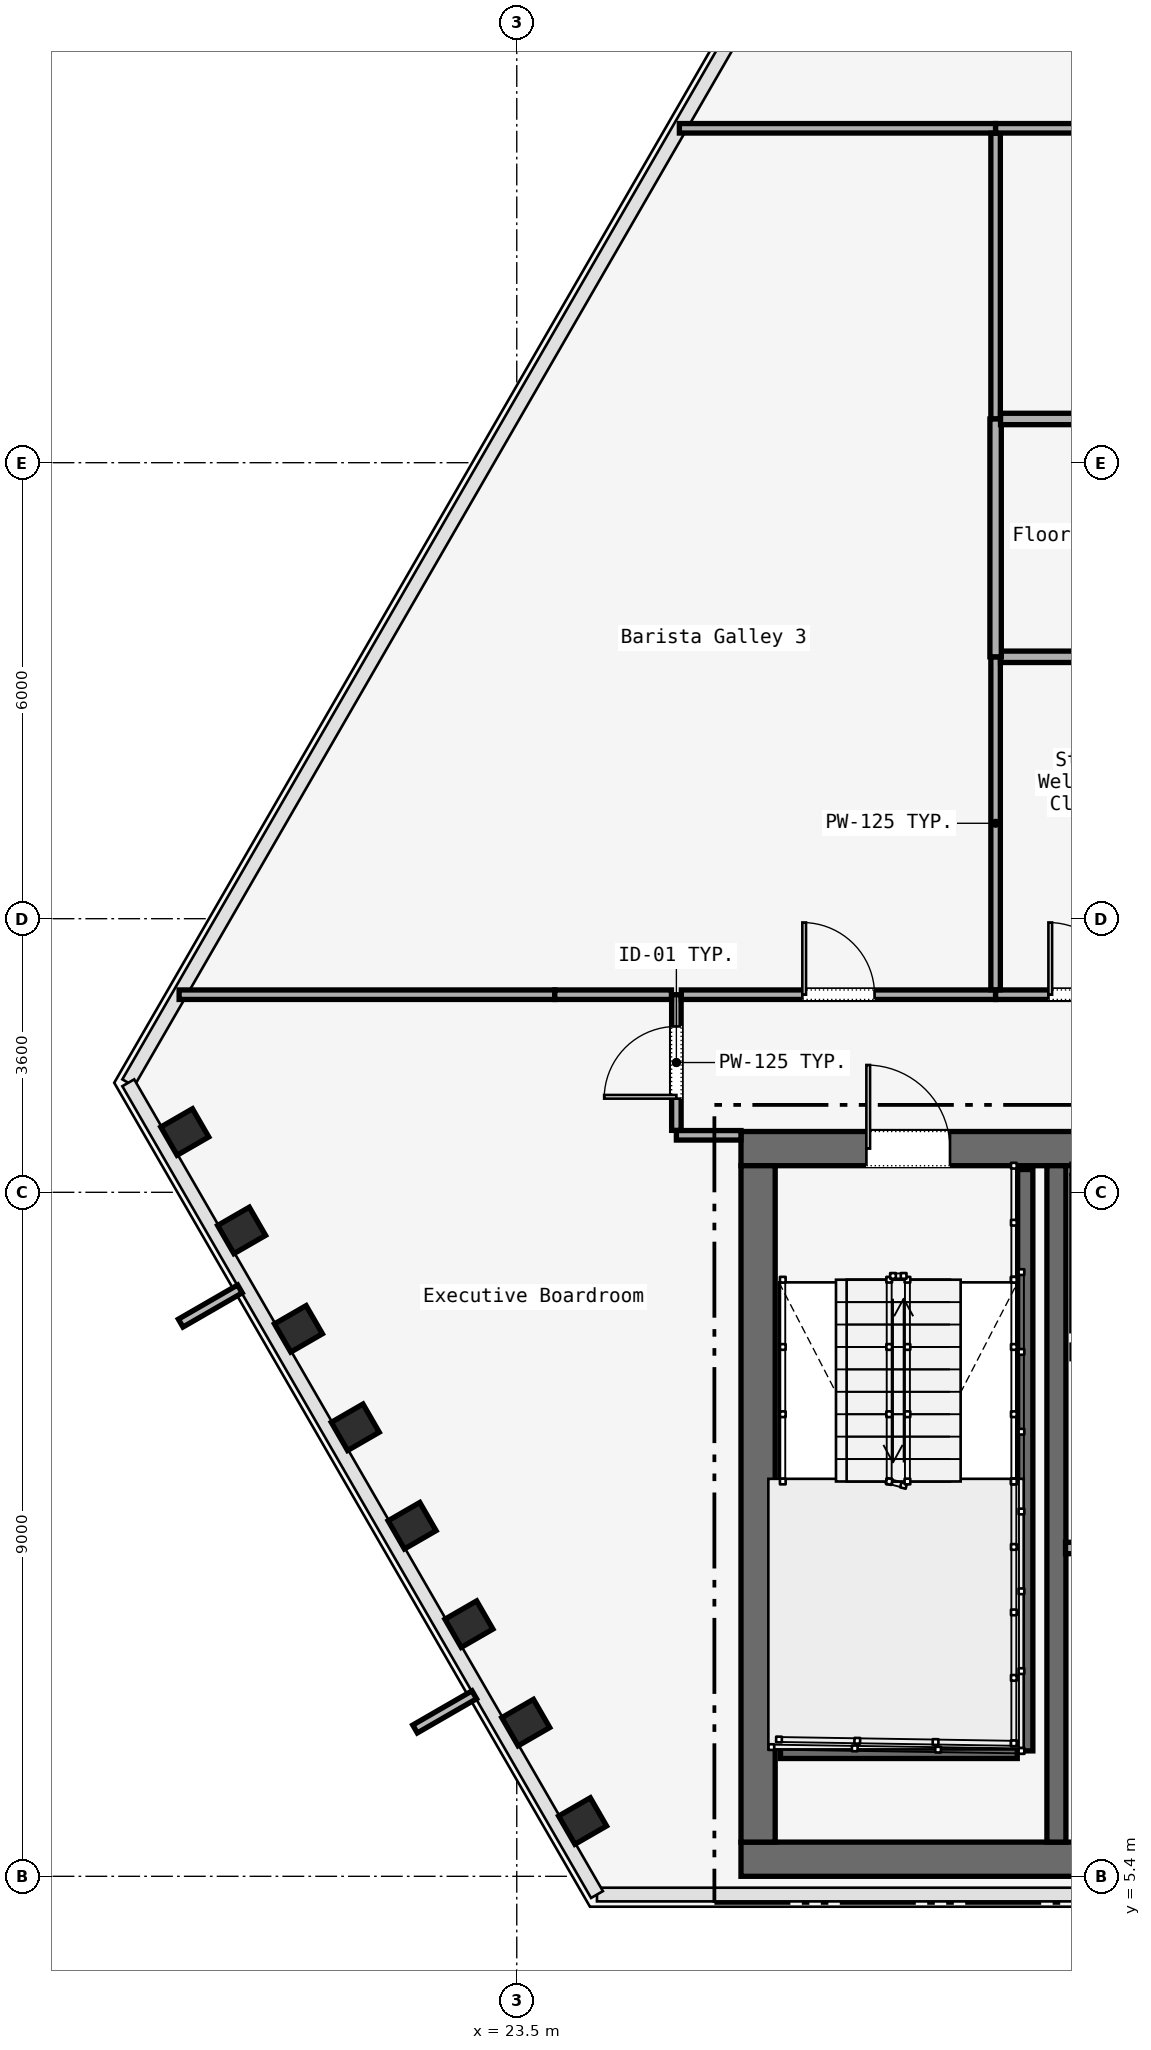
"""IFC4 building model, lengths in metres.
Left out: names, types, materials, properties, quantities, classifications, styles, units other than length and angle.
Written with IfcOpenShell. Run it as: python <this file> out.ifc"""

import sys

from ifc_helpers import new_model, si_unit, direction, frame, frame_2d, origin, origin_2d, place, context, subcontext, project, spatial, rectangle, i_section, extrude, element, fill, save


model = new_model("IFC4")
c1 = context("Model", 3, precision=1e-05, world=origin(), true_north=direction((0.0, 1.0)))
c2 = subcontext(c1, "Body", "Model", "MODEL_VIEW")
j1 = project(units=[si_unit("LENGTHUNIT", "METRE"), si_unit("PLANEANGLEUNIT", "RADIAN")], contexts=[c1])
p1 = place(None, origin())
s1 = spatial("IfcSite", under=j1, at=p1, CompositionType="ELEMENT")
p2 = place(p1, origin())
s2 = spatial("IfcBuilding", under=s1, at=p2, CompositionType="ELEMENT")
p3 = place(p2, frame((0.0, 0.0, 127.0)))
s3 = spatial("IfcBuildingStorey", under=s2, at=p3, CompositionType="ELEMENT", Elevation=127.0)
p4 = place(p3, frame((26.45, 14.975, 0.0), z_axis=(0.0, 0.0, 1.0), x_axis=(1.0, 0.0, 0.0)))
e1 = element("IfcWall", 1, at=p4, inside=s3, PredefinedType="SOLIDWALL", context=c2, shape_type="SweptSolid", body=[
    extrude(rectangle(XDim=31.1, YDim=0.45, at=frame_2d((15.55, 0.0))), origin(), (0.0, 0.0, 1.0), 3.58),
])
p5 = place(p4, frame((1.65, 0.0, 0.0)))
e2 = element("IfcOpeningElement", 2, at=p5, cuts=e1, PredefinedType="OPENING", context=c2, shape_type="SweptSolid", body=[
    extrude(rectangle(XDim=1.1, YDim=2.2, at=frame_2d((0.55, 1.1))), frame((0.0, 0.225, 0.0), z_axis=(0.0, -1.0, 0.0), x_axis=(1.0, 0.0, 0.0)), (0.0, 0.0, 1.0), 0.45),
])
p6 = place(p4, frame((13.65, 0.0, 0.0)))
e3 = element("IfcOpeningElement", 3, at=p6, cuts=e1, PredefinedType="OPENING", context=c2, shape_type="SweptSolid", body=[
    extrude(rectangle(XDim=1.1, YDim=2.2, at=frame_2d((0.55, 1.1))), frame((0.0, 0.225, 0.0), z_axis=(0.0, -1.0, 0.0), x_axis=(1.0, 0.0, 0.0)), (0.0, 0.0, 1.0), 0.45),
])
p7 = place(p4, frame((25.55, 0.0, 0.0)))
e4 = element("IfcOpeningElement", 4, at=p7, cuts=e1, PredefinedType="OPENING", context=c2, shape_type="SweptSolid", body=[
    extrude(rectangle(XDim=1.1, YDim=2.2, at=frame_2d((0.55, 1.1))), frame((0.0, 0.225, 0.0), z_axis=(0.0, -1.0, 0.0), x_axis=(1.0, 0.0, 0.0)), (0.0, 0.0, 1.0), 0.45),
])
p8 = place(p4, frame((10.7, 0.0, 0.0)))
e5 = element("IfcOpeningElement", 5, at=p8, cuts=e1, PredefinedType="OPENING", context=c2, shape_type="SweptSolid", body=[
    extrude(rectangle(XDim=1.4, YDim=2.2, at=frame_2d((0.7, 1.1))), frame((0.0, 0.225, 0.0), z_axis=(0.0, -1.0, 0.0), x_axis=(1.0, 0.0, 0.0)), (0.0, 0.0, 1.0), 0.45),
])
p9 = place(p4, frame((19.35, 0.0, 0.0)))
e6 = element("IfcOpeningElement", 6, at=p9, cuts=e1, PredefinedType="OPENING", context=c2, shape_type="SweptSolid", body=[
    extrude(rectangle(XDim=1.1, YDim=2.2, at=frame_2d((0.55, 1.1))), frame((0.0, 0.225, 0.0), z_axis=(0.0, -1.0, 0.0), x_axis=(1.0, 0.0, 0.0)), (0.0, 0.0, 1.0), 0.45),
])
p10 = place(p4, frame((21.4, 0.0, 0.0)))
e7 = element("IfcOpeningElement", 7, at=p10, cuts=e1, PredefinedType="OPENING", context=c2, shape_type="SweptSolid", body=[
    extrude(rectangle(XDim=0.9, YDim=2.1, at=frame_2d((0.45, 1.05))), frame((0.0, 0.225, 0.0), z_axis=(0.0, -1.0, 0.0), x_axis=(1.0, 0.0, 0.0)), (0.0, 0.0, 1.0), 0.45),
])
p11 = place(p4, frame((23.35, 0.0, 0.0)))
e8 = element("IfcOpeningElement", 8, at=p11, cuts=e1, PredefinedType="OPENING", context=c2, shape_type="SweptSolid", body=[
    extrude(rectangle(XDim=1.3, YDim=2.3, at=frame_2d((0.65, 1.15))), frame((0.0, 0.225, 0.0), z_axis=(0.0, -1.0, 0.0), x_axis=(1.0, 0.0, 0.0)), (0.0, 0.0, 1.0), 0.45),
])
p12 = place(p3, frame((26.45, 5.625, 0.0), z_axis=(0.0, 0.0, 1.0), x_axis=(1.0, 0.0, 0.0)))
e9 = element("IfcWall", 9, at=p12, inside=s3, PredefinedType="SOLIDWALL", context=c2, shape_type="SweptSolid", body=[
    extrude(rectangle(XDim=31.1, YDim=0.45, at=frame_2d((15.55, 0.0))), origin(), (0.0, 0.0, 1.0), 3.58),
])
p13 = place(p3, frame((26.675, 5.85, 0.0), z_axis=(0.0, 0.0, 1.0), x_axis=(0.0, 1.0, 0.0)))
e10 = element("IfcWall", 10, at=p13, inside=s3, PredefinedType="SOLIDWALL", context=c2, shape_type="SweptSolid", body=[
    extrude(rectangle(XDim=8.9, YDim=0.45, at=frame_2d((4.45, 0.0))), origin(), (0.0, 0.0, 1.0), 3.58),
])
p14 = place(p3, frame((30.6, 5.85, 0.0), z_axis=(0.0, 0.0, 1.0), x_axis=(0.0, 1.0, 0.0)))
e11 = element("IfcWall", 11, at=p14, inside=s3, PredefinedType="SOLIDWALL", context=c2, shape_type="SweptSolid", body=[
    extrude(rectangle(XDim=8.9, YDim=0.25, at=frame_2d((4.45, 0.0))), origin(), (0.0, 0.0, 1.0), 3.58),
])
for number, where, z_axis, x_axis in (
    (12, (19.132, 15.194, 0.0), (0.0, 0.0, 1.0), (-0.5, 0.866, 0.0)),
    (13, (19.88, 13.898, 0.0), (0.0, 0.0, 1.0), (-0.5, 0.866, 0.0)),
    (14, (20.627, 12.603, 0.0), (0.0, 0.0, 1.0), (-0.5, 0.866, 0.0)),
    (15, (21.375, 11.308, 0.0), (0.0, 0.0, 1.0), (-0.5, 0.866, 0.0)),
    (16, (22.123, 10.013, 0.0), (0.0, 0.0, 1.0), (-0.5, 0.866, 0.0)),
    (17, (22.871, 8.718, 0.0), (0.0, 0.0, 1.0), (-0.5, 0.866, 0.0)),
    (18, (23.618, 7.423, 0.0), (0.0, 0.0, 1.0), (-0.5, 0.866, 0.0)),
    (19, (24.366, 6.128, 0.0), (0.0, 0.0, 1.0), (-0.5, 0.866, 0.0)),
):
    element("IfcColumn", number, at=place(p3, frame(where, z_axis=z_axis, x_axis=x_axis)), inside=s3, PredefinedType="COLUMN", context=c2, shape_type="SweptSolid", body=[
        extrude(i_section(OverallWidth=0.428, OverallDepth=0.481, WebThickness=0.051, FlangeThickness=0.065, FilletRadius=0.015, at=origin_2d()), origin(), (0.0, 0.0, 1.0), 3.58),
    ])
p15 = place(p3, frame((30.19, 14.7, 0.0), z_axis=(0.0, 0.0, 1.0), x_axis=(0.0, -1.0, 0.0)))
e20 = element("IfcWall", 20, at=p15, inside=s3, PredefinedType="SOLIDWALL", context=c2, shape_type="SweptSolid", body=[
    extrude(rectangle(XDim=7.65, YDim=0.2, at=frame_2d((3.825, 0.0))), origin(), (0.0, 0.0, 1.0), 3.8),
])
p16 = place(p3, frame((26.97, 7.05, 0.0), z_axis=(0.0, 0.0, 1.0), x_axis=(1.0, 0.0, 0.0)))
e21 = element("IfcWall", 21, at=p16, inside=s3, PredefinedType="SOLIDWALL", context=c2, shape_type="SweptSolid", body=[
    extrude(rectangle(XDim=3.115, YDim=0.2, at=frame_2d((1.558, 0.0))), origin(), (0.0, 0.0, 1.0), 3.8),
])
p17 = place(p3, frame((30.72, 9.72, 0.0), z_axis=(0.0, 0.0, 1.0), x_axis=(1.0, 0.0, 0.0)))
e22 = element("IfcWall", 22, at=p17, inside=s3, PredefinedType="PARTITIONING", context=c2, shape_type="SweptSolid", body=[
    extrude(rectangle(XDim=7.96, YDim=0.15, at=frame_2d((3.98, 0.0))), origin(), (0.0, 0.0, 1.0), 3.01),
])
p18 = place(p17, frame((1.5, 0.0, 0.0)))
e23 = element("IfcOpeningElement", 23, at=p18, cuts=e22, PredefinedType="OPENING", context=c2, shape_type="SweptSolid", body=[
    extrude(rectangle(XDim=0.95, YDim=2.2, at=frame_2d((0.475, 1.1))), frame((0.0, 0.075, 0.0), z_axis=(0.0, -1.0, 0.0), x_axis=(1.0, 0.0, 0.0)), (0.0, 0.0, 1.0), 0.15),
])
p19 = place(p17, frame((6.21, 0.0, 0.0)))
e24 = element("IfcOpeningElement", 24, at=p19, cuts=e22, PredefinedType="OPENING", context=c2, shape_type="SweptSolid", body=[
    extrude(rectangle(XDim=0.95, YDim=2.2, at=frame_2d((0.475, 1.1))), frame((0.0, 0.075, 0.0), z_axis=(0.0, -1.0, 0.0), x_axis=(1.0, 0.0, 0.0)), (0.0, 0.0, 1.0), 0.15),
])
p20 = place(p3, frame((26.45, 15.15, 0.0), z_axis=(0.0, 0.0, 1.0), x_axis=(-1.0, 0.0, 0.0)))
e25 = element("IfcWall", 25, at=p20, inside=s3, PredefinedType="PARTITIONING", context=c2, shape_type="SweptSolid", body=[
    extrude(rectangle(XDim=0.85, YDim=0.125, at=frame_2d((0.425, 0.0))), origin(), (0.0, 0.0, 1.0), 3.01),
])
p21 = place(p3, frame((25.6, 15.215, 0.0), z_axis=(0.0, 0.0, 1.0), x_axis=(0.0, 1.0, 0.0)))
e26 = element("IfcWall", 26, at=p21, inside=s3, PredefinedType="PARTITIONING", context=c2, shape_type="SweptSolid", body=[
    extrude(rectangle(XDim=1.785, YDim=0.125, at=frame_2d((0.893, 0.0))), origin(), (0.0, 0.0, 1.0), 3.01),
])
p22 = place(p21, frame((0.417, 0.0, 0.0)))
e27 = element("IfcOpeningElement", 27, at=p22, cuts=e26, PredefinedType="OPENING", context=c2, shape_type="SweptSolid", body=[
    extrude(rectangle(XDim=0.95, YDim=2.2, at=frame_2d((0.475, 1.1))), frame((0.0, 0.062, 0.0), z_axis=(0.0, -1.0, 0.0), x_axis=(1.0, 0.0, 0.0)), (0.0, 0.0, 1.0), 0.125),
])
p23 = place(p3, frame((25.665, 17.0, 0.0), z_axis=(0.0, 0.0, 1.0), x_axis=(1.0, 0.0, 0.0)))
e28 = element("IfcWall", 28, at=p23, inside=s3, PredefinedType="PARTITIONING", context=c2, shape_type="SweptSolid", body=[
    extrude(rectangle(XDim=4.135, YDim=0.125, at=frame_2d((2.067, 0.0))), origin(), (0.0, 0.0, 1.0), 3.01),
])
p24 = place(p23, frame((1.593, 0.0, 0.0)))
e29 = element("IfcOpeningElement", 29, at=p24, cuts=e28, PredefinedType="OPENING", context=c2, shape_type="SweptSolid", body=[
    extrude(rectangle(XDim=0.95, YDim=2.2, at=frame_2d((0.475, 1.1))), frame((0.0, 0.062, 0.0), z_axis=(0.0, -1.0, 0.0), x_axis=(1.0, 0.0, 0.0)), (0.0, 0.0, 1.0), 0.125),
])
p25 = place(p3, frame((29.8, 17.0, 0.0), z_axis=(0.0, 0.0, 1.0), x_axis=(1.0, 0.0, 0.0)))
e30 = element("IfcWall", 30, at=p25, inside=s3, PredefinedType="PARTITIONING", context=c2, shape_type="SweptSolid", body=[
    extrude(rectangle(XDim=2.34, YDim=0.125, at=frame_2d((1.17, 0.0))), origin(), (0.0, 0.0, 1.0), 3.01),
])
p26 = place(p25, frame((0.695, 0.0, 0.0)))
e31 = element("IfcOpeningElement", 31, at=p26, cuts=e30, PredefinedType="OPENING", context=c2, shape_type="SweptSolid", body=[
    extrude(rectangle(XDim=0.95, YDim=2.2, at=frame_2d((0.475, 1.1))), frame((0.0, 0.062, 0.0), z_axis=(0.0, -1.0, 0.0), x_axis=(1.0, 0.0, 0.0)), (0.0, 0.0, 1.0), 0.125),
])
p27 = place(p3, frame((19.058, 17.0, 0.0), z_axis=(0.0, 0.0, 1.0), x_axis=(1.0, 0.0, 0.0)))
e32 = element("IfcWall", 32, at=p27, inside=s3, PredefinedType="PARTITIONING", context=c2, shape_type="SweptSolid", body=[
    extrude(rectangle(XDim=4.942, YDim=0.125, at=frame_2d((2.471, 0.0))), origin(), (0.0, 0.0, 1.0), 3.01),
])
p28 = place(p3, frame((24.0, 17.0, 0.0), z_axis=(0.0, 0.0, 1.0), x_axis=(1.0, 0.0, 0.0)))
e33 = element("IfcWall", 33, at=p28, inside=s3, PredefinedType="PARTITIONING", context=c2, shape_type="SweptSolid", body=[
    extrude(rectangle(XDim=1.535, YDim=0.125, at=frame_2d((0.768, 0.0))), origin(), (0.0, 0.0, 1.0), 3.01),
])
p29 = place(p3, frame((29.8, 17.065, 0.0), z_axis=(0.0, 0.0, 1.0), x_axis=(0.0, 1.0, 0.0)))
e34 = element("IfcWall", 34, at=p29, inside=s3, PredefinedType="PARTITIONING", context=c2, shape_type="SweptSolid", body=[
    extrude(rectangle(XDim=4.381, YDim=0.125, at=frame_2d((2.19, 0.0))), origin(), (0.0, 0.0, 1.0), 3.01),
])
p30 = place(p3, frame((29.865, 21.446, 0.0), z_axis=(0.0, 0.0, 1.0), x_axis=(1.0, 0.0, 0.0)))
e35 = element("IfcWall", 35, at=p30, inside=s3, PredefinedType="PARTITIONING", context=c2, shape_type="SweptSolid", body=[
    extrude(rectangle(XDim=2.21, YDim=0.15, at=frame_2d((1.105, 0.0))), origin(), (0.0, 0.0, 1.0), 3.01),
])
p31 = place(p3, frame((25.639, 28.4, 0.0), z_axis=(0.0, 0.0, 1.0), x_axis=(1.0, 0.0, 0.0)))
e36 = element("IfcWall", 36, at=p31, inside=s3, PredefinedType="PARTITIONING", context=c2, shape_type="SweptSolid", body=[
    extrude(rectangle(XDim=4.161, YDim=0.125, at=frame_2d((2.08, 0.0))), origin(), (0.0, 0.0, 1.0), 3.01),
])
p32 = place(p3, frame((29.8, 28.335, 0.0), z_axis=(0.0, 0.0, 1.0), x_axis=(0.0, -1.0, 0.0)))
e37 = element("IfcWall", 37, at=p32, inside=s3, PredefinedType="PARTITIONING", context=c2, shape_type="SweptSolid", body=[
    extrude(rectangle(XDim=3.76, YDim=0.125, at=frame_2d((1.88, 0.0))), origin(), (0.0, 0.0, 1.0), 3.01),
])
p33 = place(p3, frame((29.8, 24.575, 0.0), z_axis=(0.0, 0.0, 1.0), x_axis=(0.0, -1.0, 0.0)))
e38 = element("IfcWall", 38, at=p33, inside=s3, PredefinedType="PARTITIONING", context=c2, shape_type="SweptSolid", body=[
    extrude(rectangle(XDim=3.129, YDim=0.15, at=frame_2d((1.564, 0.0))), origin(), (0.0, 0.0, 1.0), 3.01),
])
p34 = place(p3, frame((29.865, 24.575, 0.0), z_axis=(0.0, 0.0, 1.0), x_axis=(1.0, 0.0, 0.0)))
e39 = element("IfcWall", 39, at=p34, inside=s3, PredefinedType="PARTITIONING", context=c2, shape_type="SweptSolid", body=[
    extrude(rectangle(XDim=5.87, YDim=0.15, at=frame_2d((2.935, 0.0))), origin(), (0.0, 0.0, 1.0), 3.01),
])
p35 = place(p3, frame((29.8, 28.4, 0.0), z_axis=(0.0, 0.0, 1.0), x_axis=(1.0, 0.0, 0.0)))
e40 = element("IfcWall", 40, at=p35, inside=s3, PredefinedType="PARTITIONING", context=c2, shape_type="SweptSolid", body=[
    extrude(rectangle(XDim=5.0, YDim=0.125, at=frame_2d((2.5, 0.0))), origin(), (0.0, 0.0, 1.0), 3.01),
])
p36 = place(p5, origin())
e41 = element("IfcDoor", 41, at=p36, inside=s3, OperationType="SINGLE_SWING_RIGHT", PredefinedType="DOOR", context=c2, shape_type="SweptSolid", body=[
    extrude(rectangle(XDim=1.1, YDim=2.2, at=frame_2d((0.55, 1.1))), frame((0.0, 0.025, 0.0), z_axis=(0.0, -1.0, 0.0), x_axis=(1.0, 0.0, 0.0)), (0.0, 0.0, 1.0), 0.05),
])
fill(e2, e41)
p37 = place(p22, origin())
e42 = element("IfcDoor", 42, at=p37, inside=s3, OperationType="SINGLE_SWING_RIGHT", PredefinedType="DOOR", context=c2, shape_type="SweptSolid", body=[
    extrude(rectangle(XDim=0.95, YDim=2.2, at=frame_2d((0.475, 1.1))), frame((0.0, 0.025, 0.0), z_axis=(0.0, -1.0, 0.0), x_axis=(1.0, 0.0, 0.0)), (0.0, 0.0, 1.0), 0.05),
])
fill(e27, e42)
p38 = place(p26, origin())
e43 = element("IfcDoor", 43, at=p38, inside=s3, OperationType="SINGLE_SWING_RIGHT", PredefinedType="DOOR", context=c2, shape_type="SweptSolid", body=[
    extrude(rectangle(XDim=0.95, YDim=2.2, at=frame_2d((0.475, 1.1))), frame((0.0, 0.025, 0.0), z_axis=(0.0, -1.0, 0.0), x_axis=(1.0, 0.0, 0.0)), (0.0, 0.0, 1.0), 0.05),
])
fill(e31, e43)
p39 = place(p24, origin())
e44 = element("IfcDoor", 44, at=p39, inside=s3, OperationType="SINGLE_SWING_LEFT", PredefinedType="DOOR", context=c2, shape_type="SweptSolid", body=[
    extrude(rectangle(XDim=0.95, YDim=2.2, at=frame_2d((0.475, 1.1))), frame((0.0, 0.025, 0.0), z_axis=(0.0, -1.0, 0.0), x_axis=(1.0, 0.0, 0.0)), (0.0, 0.0, 1.0), 0.05),
])
fill(e29, e44)
save(model, sys.argv[1])
